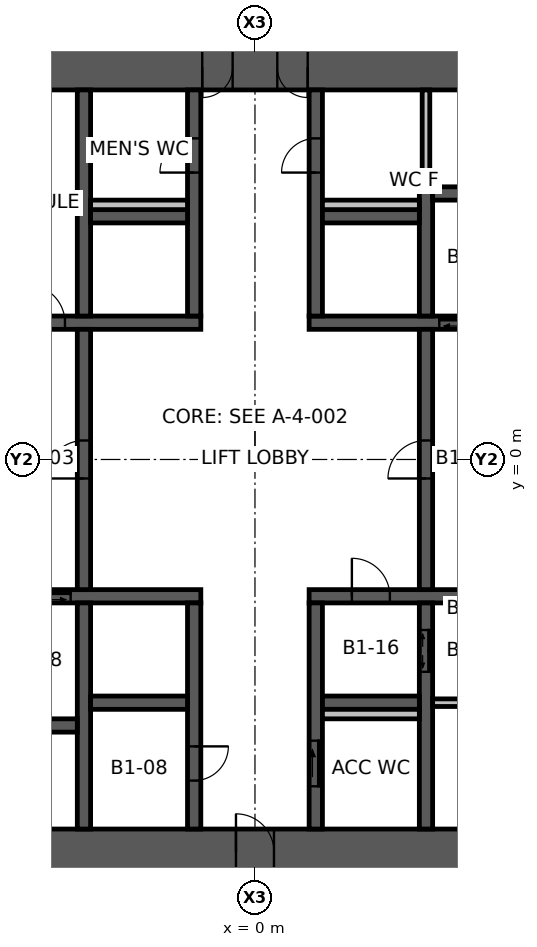
"""IFC4 building model, lengths in metres.
Left out: names, types, materials, properties, quantities, classifications, styles, units other than length and angle.
Written with IfcOpenShell. Run it as: python <this file> out.ifc"""

import sys

from ifc_helpers import new_model, si_unit, direction, frame, frame_2d, origin, place, context, subcontext, project, spatial, polyline, rectangle, outline, extrude, element, fill, save


model = new_model("IFC4")
c1 = context("Model", 3, precision=1e-05, world=origin(), true_north=direction((0.0, 1.0)))
c2 = subcontext(c1, "Body", "Model", "MODEL_VIEW")
j1 = project(units=[si_unit("LENGTHUNIT", "METRE"), si_unit("PLANEANGLEUNIT", "RADIAN")], contexts=[c1])
p1 = place(None, origin())
s1 = spatial("IfcSite", under=j1, at=p1, CompositionType="ELEMENT")
p2 = place(p1, origin())
s2 = spatial("IfcBuilding", under=s1, at=p2, CompositionType="ELEMENT")
p3 = place(p2, frame((0.0, 0.0, -5.0)))
s3 = spatial("IfcBuildingStorey", under=s2, at=p3, CompositionType="ELEMENT", Elevation=-5.0)
p4 = place(p3, frame((5.961, 10.325, 0.0), z_axis=(0.0, 0.0, 1.0), x_axis=(-1.0, 0.0, 0.0)))
e1 = element("IfcWall", 1, at=p4, inside=s3, PredefinedType="SHEAR", context=c2, shape_type="SweptSolid", body=[
    extrude(outline(polyline([(-0.346, -0.6), (4.574, -0.6), (5.374, -0.6), (6.549, -0.6), (7.349, -0.6), (12.269, -0.6), (11.576, 0.6), (7.349, 0.6), (6.549, 0.6), (5.374, 0.6), (4.574, 0.6), (0.346, 0.6), (-0.346, -0.6)])), origin(), (0.0, 0.0, 1.0), 5.0),
])
p5 = place(p4, frame((6.549, 0.0, 0.0)))
e2 = element("IfcOpeningElement", 2, at=p5, cuts=e1, PredefinedType="OPENING", context=c2, shape_type="SweptSolid", body=[
    extrude(rectangle(XDim=0.8, YDim=2.1, at=frame_2d((0.4, 1.05))), frame((0.0, 0.61, 0.0), z_axis=(0.0, -1.0, 0.0), x_axis=(1.0, 0.0, 0.0)), (0.0, 0.0, 1.0), 1.22),
])
p6 = place(p4, frame((4.574, 0.0, 0.0)))
e3 = element("IfcOpeningElement", 3, at=p6, cuts=e1, PredefinedType="OPENING", context=c2, shape_type="SweptSolid", body=[
    extrude(rectangle(XDim=0.8, YDim=2.1, at=frame_2d((0.4, 1.05))), frame((0.0, 0.61, 0.0), z_axis=(0.0, -1.0, 0.0), x_axis=(1.0, 0.0, 0.0)), (0.0, 0.0, 1.0), 1.22),
])
p7 = place(p3, frame((-5.961, -10.325, 0.0), z_axis=(0.0, 0.0, 1.0), x_axis=(1.0, 0.0, 0.0)))
e4 = element("IfcWall", 4, at=p7, inside=s3, PredefinedType="SHEAR", context=c2, shape_type="SweptSolid", body=[
    extrude(outline(polyline([(-0.346, -0.6), (5.461, -0.6), (6.461, -0.6), (12.269, -0.6), (11.576, 0.6), (6.461, 0.6), (5.461, 0.6), (0.346, 0.6), (-0.346, -0.6)])), origin(), (0.0, 0.0, 1.0), 5.0),
])
p8 = place(p7, frame((5.461, 0.0, 0.0)))
e5 = element("IfcOpeningElement", 5, at=p8, cuts=e4, PredefinedType="OPENING", context=c2, shape_type="SweptSolid", body=[
    extrude(rectangle(XDim=1.0, YDim=2.1, at=frame_2d((0.5, 1.05))), frame((0.0, 0.61, 0.0), z_axis=(0.0, -1.0, 0.0), x_axis=(1.0, 0.0, 0.0)), (0.0, 0.0, 1.0), 1.22),
])
p9 = place(p3, frame((-9.151, 3.6, 0.0), z_axis=(0.0, 0.0, 1.0), x_axis=(1.0, 0.0, 0.0)))
e6 = element("IfcWall", 6, at=p9, inside=s3, PredefinedType="SHEAR", context=c2, shape_type="SweptSolid", body=[
    extrude(outline(polyline([(-0.101, -0.175), (3.151, -0.175), (4.151, -0.175), (7.726, -0.175), (7.726, 0.175), (4.151, 0.175), (3.151, 0.175), (0.101, 0.175), (-0.101, -0.175)])), origin(), (0.0, 0.0, 1.0), 5.0),
])
p10 = place(p9, frame((3.151, 0.0, 0.0)))
e7 = element("IfcOpeningElement", 7, at=p10, cuts=e6, PredefinedType="OPENING", context=c2, shape_type="SweptSolid", body=[
    extrude(rectangle(XDim=1.0, YDim=2.1, at=frame_2d((0.5, 1.05))), frame((0.0, 0.185, 0.0), z_axis=(0.0, -1.0, 0.0), x_axis=(1.0, 0.0, 0.0)), (0.0, 0.0, 1.0), 0.37),
])
p11 = place(p3, frame((1.425, 3.6, 0.0), z_axis=(0.0, 0.0, 1.0), x_axis=(1.0, 0.0, 0.0)))
e8 = element("IfcWall", 8, at=p11, inside=s3, PredefinedType="SHEAR", context=c2, shape_type="SweptSolid", body=[
    extrude(outline(polyline([(0.0, -0.175), (3.425, -0.175), (4.725, -0.175), (7.827, -0.175), (7.625, 0.175), (4.725, 0.175), (3.425, 0.175), (0.0, 0.175), (0.0, -0.175)])), origin(), (0.0, 0.0, 1.0), 5.0),
])
p12 = place(p11, frame((3.425, 0.0, 0.0)))
e9 = element("IfcOpeningElement", 9, at=p12, cuts=e8, PredefinedType="OPENING", context=c2, shape_type="SweptSolid", body=[
    extrude(rectangle(XDim=1.3, YDim=2.1, at=frame_2d((0.65, 1.05))), frame((0.0, 0.185, 0.0), z_axis=(0.0, -1.0, 0.0), x_axis=(1.0, 0.0, 0.0)), (0.0, 0.0, 1.0), 0.37),
])
p13 = place(p3, frame((-9.151, -3.6, 0.0), z_axis=(0.0, 0.0, 1.0), x_axis=(1.0, 0.0, 0.0)))
e10 = element("IfcWall", 10, at=p13, inside=s3, PredefinedType="SHEAR", context=c2, shape_type="SweptSolid", body=[
    extrude(outline(polyline([(0.101, -0.175), (3.001, -0.175), (4.301, -0.175), (7.726, -0.175), (7.726, 0.175), (4.301, 0.175), (3.001, 0.175), (-0.101, 0.175), (0.101, -0.175)])), origin(), (0.0, 0.0, 1.0), 5.0),
])
p14 = place(p13, frame((3.001, 0.0, 0.0)))
e11 = element("IfcOpeningElement", 11, at=p14, cuts=e10, PredefinedType="OPENING", context=c2, shape_type="SweptSolid", body=[
    extrude(rectangle(XDim=1.3, YDim=2.1, at=frame_2d((0.65, 1.05))), frame((0.0, 0.185, 0.0), z_axis=(0.0, -1.0, 0.0), x_axis=(1.0, 0.0, 0.0)), (0.0, 0.0, 1.0), 0.37),
])
p15 = place(p3, frame((1.425, -3.6, 0.0), z_axis=(0.0, 0.0, 1.0), x_axis=(1.0, 0.0, 0.0)))
e12 = element("IfcWall", 12, at=p15, inside=s3, PredefinedType="SHEAR", context=c2, shape_type="SweptSolid", body=[
    extrude(outline(polyline([(0.0, -0.175), (1.125, -0.175), (2.125, -0.175), (7.625, -0.175), (7.827, 0.175), (2.125, 0.175), (1.125, 0.175), (0.0, 0.175), (0.0, -0.175)])), origin(), (0.0, 0.0, 1.0), 5.0),
])
p16 = place(p15, frame((1.125, 0.0, 0.0)))
e13 = element("IfcOpeningElement", 13, at=p16, cuts=e12, PredefinedType="OPENING", context=c2, shape_type="SweptSolid", body=[
    extrude(rectangle(XDim=1.0, YDim=2.1, at=frame_2d((0.5, 1.05))), frame((0.0, 0.185, 0.0), z_axis=(0.0, -1.0, 0.0), x_axis=(1.0, 0.0, 0.0)), (0.0, 0.0, 1.0), 0.37),
])
p17 = place(p3, frame((-1.6, 3.775, 0.0), z_axis=(0.0, 0.0, 1.0), x_axis=(0.0, 1.0, 0.0)))
e14 = element("IfcWall", 14, at=p17, inside=s3, PredefinedType="SHEAR", context=c2, shape_type="SweptSolid", body=[
    extrude(rectangle(XDim=5.95, YDim=0.35, at=frame_2d((2.975, 0.0))), origin(), (0.0, 0.0, 1.0), 5.0),
])
p18 = place(p17, frame((3.775, 0.0, 0.0)))
e15 = element("IfcOpeningElement", 15, at=p18, cuts=e14, PredefinedType="OPENING", context=c2, shape_type="SweptSolid", body=[
    extrude(rectangle(XDim=0.9, YDim=2.1, at=frame_2d((0.45, 1.05))), frame((0.0, 0.185, 0.0), z_axis=(0.0, -1.0, 0.0), x_axis=(1.0, 0.0, 0.0)), (0.0, 0.0, 1.0), 0.37),
])
p19 = place(p3, frame((1.6, 3.775, 0.0), z_axis=(0.0, 0.0, 1.0), x_axis=(0.0, 1.0, 0.0)))
e16 = element("IfcWall", 16, at=p19, inside=s3, PredefinedType="SHEAR", context=c2, shape_type="SweptSolid", body=[
    extrude(rectangle(XDim=5.95, YDim=0.35, at=frame_2d((2.975, 0.0))), origin(), (0.0, 0.0, 1.0), 5.0),
])
p20 = place(p19, frame((3.775, 0.0, 0.0)))
e17 = element("IfcOpeningElement", 17, at=p20, cuts=e16, PredefinedType="OPENING", context=c2, shape_type="SweptSolid", body=[
    extrude(rectangle(XDim=0.9, YDim=2.1, at=frame_2d((0.45, 1.05))), frame((0.0, 0.185, 0.0), z_axis=(0.0, -1.0, 0.0), x_axis=(1.0, 0.0, 0.0)), (0.0, 0.0, 1.0), 0.37),
])
p21 = place(p3, frame((-1.6, -3.775, 0.0), z_axis=(0.0, 0.0, 1.0), x_axis=(0.0, -1.0, 0.0)))
e18 = element("IfcWall", 18, at=p21, inside=s3, PredefinedType="SHEAR", context=c2, shape_type="SweptSolid", body=[
    extrude(rectangle(XDim=5.95, YDim=0.35, at=frame_2d((2.975, 0.0))), origin(), (0.0, 0.0, 1.0), 5.0),
])
p22 = place(p21, frame((3.775, 0.0, 0.0)))
e19 = element("IfcOpeningElement", 19, at=p22, cuts=e18, PredefinedType="OPENING", context=c2, shape_type="SweptSolid", body=[
    extrude(rectangle(XDim=0.9, YDim=2.1, at=frame_2d((0.45, 1.05))), frame((0.0, 0.185, 0.0), z_axis=(0.0, -1.0, 0.0), x_axis=(1.0, 0.0, 0.0)), (0.0, 0.0, 1.0), 0.37),
])
p23 = place(p3, frame((1.6, -3.775, 0.0), z_axis=(0.0, 0.0, 1.0), x_axis=(0.0, -1.0, 0.0)))
e20 = element("IfcWall", 20, at=p23, inside=s3, PredefinedType="SHEAR", context=c2, shape_type="SweptSolid", body=[
    extrude(rectangle(XDim=5.95, YDim=0.35, at=frame_2d((2.975, 0.0))), origin(), (0.0, 0.0, 1.0), 5.0),
])
p24 = place(p23, frame((3.625, 0.0, 0.0)))
e21 = element("IfcOpeningElement", 21, at=p24, cuts=e20, PredefinedType="OPENING", context=c2, shape_type="SweptSolid", body=[
    extrude(rectangle(XDim=1.2, YDim=2.1, at=frame_2d((0.6, 1.05))), frame((0.0, 0.185, 0.0), z_axis=(0.0, -1.0, 0.0), x_axis=(1.0, 0.0, 0.0)), (0.0, 0.0, 1.0), 0.37),
])
p25 = place(p3, frame((-4.5, -3.425, 0.0), z_axis=(0.0, 0.0, 1.0), x_axis=(0.0, 1.0, 0.0)))
e22 = element("IfcWall", 22, at=p25, inside=s3, PredefinedType="SHEAR", context=c2, shape_type="SweptSolid", body=[
    extrude(rectangle(XDim=6.85, YDim=0.35, at=frame_2d((3.425, 0.0))), origin(), (0.0, 0.0, 1.0), 5.0),
])
p26 = place(p25, frame((2.925, 0.0, 0.0)))
e23 = element("IfcOpeningElement", 23, at=p26, cuts=e22, PredefinedType="OPENING", context=c2, shape_type="SweptSolid", body=[
    extrude(rectangle(XDim=1.0, YDim=2.1, at=frame_2d((0.5, 1.05))), frame((0.0, 0.185, 0.0), z_axis=(0.0, -1.0, 0.0), x_axis=(1.0, 0.0, 0.0)), (0.0, 0.0, 1.0), 0.37),
])
p27 = place(p3, frame((4.5, -3.425, 0.0), z_axis=(0.0, 0.0, 1.0), x_axis=(0.0, 1.0, 0.0)))
e24 = element("IfcWall", 24, at=p27, inside=s3, PredefinedType="SHEAR", context=c2, shape_type="SweptSolid", body=[
    extrude(rectangle(XDim=6.85, YDim=0.35, at=frame_2d((3.425, 0.0))), origin(), (0.0, 0.0, 1.0), 5.0),
])
p28 = place(p27, frame((2.925, 0.0, 0.0)))
e25 = element("IfcOpeningElement", 25, at=p28, cuts=e24, PredefinedType="OPENING", context=c2, shape_type="SweptSolid", body=[
    extrude(rectangle(XDim=1.0, YDim=2.1, at=frame_2d((0.5, 1.05))), frame((0.0, 0.185, 0.0), z_axis=(0.0, -1.0, 0.0), x_axis=(1.0, 0.0, 0.0)), (0.0, 0.0, 1.0), 0.37),
])
p29 = place(p3, frame((-4.5, 3.775, 0.0), z_axis=(0.0, 0.0, 1.0), x_axis=(0.0, 1.0, 0.0)))
e26 = element("IfcWall", 26, at=p29, inside=s3, PredefinedType="SHEAR", context=c2, shape_type="SweptSolid", body=[
    extrude(rectangle(XDim=5.95, YDim=0.35, at=frame_2d((2.975, 0.0))), origin(), (0.0, 0.0, 1.0), 5.0),
])
p30 = place(p3, frame((4.5, 3.775, 0.0), z_axis=(0.0, 0.0, 1.0), x_axis=(0.0, 1.0, 0.0)))
e27 = element("IfcWall", 27, at=p30, inside=s3, PredefinedType="SHEAR", context=c2, shape_type="SweptSolid", body=[
    extrude(rectangle(XDim=3.4, YDim=0.35, at=frame_2d((1.7, 0.0))), origin(), (0.0, 0.0, 1.0), 5.0),
])
p31 = place(p3, frame((-4.5, -3.775, 0.0), z_axis=(0.0, 0.0, 1.0), x_axis=(0.0, -1.0, 0.0)))
e28 = element("IfcWall", 28, at=p31, inside=s3, PredefinedType="SHEAR", context=c2, shape_type="SweptSolid", body=[
    extrude(rectangle(XDim=5.95, YDim=0.35, at=frame_2d((2.975, 0.0))), origin(), (0.0, 0.0, 1.0), 5.0),
])
p32 = place(p3, frame((4.5, -3.775, 0.0), z_axis=(0.0, 0.0, 1.0), x_axis=(0.0, -1.0, 0.0)))
e29 = element("IfcWall", 29, at=p32, inside=s3, PredefinedType="SHEAR", context=c2, shape_type="SweptSolid", body=[
    extrude(rectangle(XDim=5.95, YDim=0.35, at=frame_2d((2.975, 0.0))), origin(), (0.0, 0.0, 1.0), 5.0),
])
p33 = place(p32, frame((0.712, 0.0, 0.0)))
e30 = element("IfcOpeningElement", 30, at=p33, cuts=e29, PredefinedType="OPENING", context=c2, shape_type="SweptSolid", body=[
    extrude(rectangle(XDim=1.1, YDim=2.1, at=frame_2d((0.55, 1.05))), frame((0.0, 0.185, 0.0), z_axis=(0.0, -1.0, 0.0), x_axis=(1.0, 0.0, 0.0)), (0.0, 0.0, 1.0), 0.37),
])
for number, where, z_axis, x_axis in (
    (31, (-4.325, 6.4, 0.0), (0.0, 0.0, 1.0), (1.0, 0.0, 0.0)),
    (32, (1.775, 6.4, 0.0), (0.0, 0.0, 1.0), (1.0, 0.0, 0.0)),
    (33, (-4.325, -6.4, 0.0), (0.0, 0.0, 1.0), (1.0, 0.0, 0.0)),
    (34, (1.775, -6.4, 0.0), (0.0, 0.0, 1.0), (1.0, 0.0, 0.0)),
):
    element("IfcWall", number, at=place(p3, frame(where, z_axis=z_axis, x_axis=x_axis)), inside=s3, PredefinedType="SHEAR", context=c2, shape_type="SweptSolid", body=[
        extrude(rectangle(XDim=2.55, YDim=0.35, at=frame_2d((1.275, 0.0))), origin(), (0.0, 0.0, 1.0), 5.0),
    ])
for number, where, z_axis, x_axis in (
    (35, (-6.925, -7.0, 0.0), (0.0, 0.0, 1.0), (1.0, 0.0, 0.0)),
    (36, (4.675, 7.0, 0.0), (0.0, 0.0, 1.0), (1.0, 0.0, 0.0)),
):
    element("IfcWall", number, at=place(p3, frame(where, z_axis=z_axis, x_axis=x_axis)), inside=s3, PredefinedType="SHEAR", context=c2, shape_type="SweptSolid", body=[
        extrude(rectangle(XDim=2.25, YDim=0.35, at=frame_2d((1.125, 0.0))), origin(), (0.0, 0.0, 1.0), 5.0),
    ])
p34 = place(p3, frame((4.5, 7.175, 0.0), z_axis=(0.0, 0.0, 1.0), x_axis=(0.0, 1.0, 0.0)))
e37 = element("IfcWall", 37, at=p34, inside=s3, PredefinedType="STANDARD", context=c2, shape_type="SweptSolid", body=[
    extrude(rectangle(XDim=2.55, YDim=0.2, at=frame_2d((1.275, 0.0))), origin(), (0.0, 0.0, 1.0), 5.0),
])
p35 = place(p3, frame((4.675, -6.4, 0.0), z_axis=(0.0, 0.0, 1.0), x_axis=(1.0, 0.0, 0.0)))
e38 = element("IfcWall", 38, at=p35, inside=s3, PredefinedType="STANDARD", context=c2, shape_type="SweptSolid", body=[
    extrude(rectangle(XDim=2.425, YDim=0.2, at=frame_2d((1.212, 0.0))), origin(), (0.0, 0.0, 1.0), 5.0),
])
for number, where, z_axis, x_axis in (
    (39, (-4.325, 6.7, 0.0), (0.0, 0.0, 1.0), (1.0, 0.0, 0.0)),
    (40, (1.775, 6.7, 0.0), (0.0, 0.0, 1.0), (1.0, 0.0, 0.0)),
    (41, (1.775, -6.7, 0.0), (0.0, 0.0, 1.0), (1.0, 0.0, 0.0)),
):
    element("IfcWall", number, at=place(p3, frame(where, z_axis=z_axis, x_axis=x_axis)), inside=s3, PredefinedType="PLUMBINGWALL", context=c2, shape_type="SweptSolid", body=[
        extrude(rectangle(XDim=2.55, YDim=0.25, at=frame_2d((1.275, 0.0))), origin(), (0.0, 0.0, 1.0), 5.0),
    ])
p36 = place(p5, origin())
e42 = element("IfcDoor", 42, at=p36, inside=s3, OperationType="SINGLE_SWING_RIGHT", PredefinedType="DOOR", context=c2, shape_type="SweptSolid", body=[
    extrude(rectangle(XDim=0.8, YDim=2.1, at=frame_2d((0.4, 1.05))), frame((0.0, 0.025, 0.0), z_axis=(0.0, -1.0, 0.0), x_axis=(1.0, 0.0, 0.0)), (0.0, 0.0, 1.0), 0.05),
])
fill(e2, e42)
p37 = place(p6, origin())
e43 = element("IfcDoor", 43, at=p37, inside=s3, OperationType="SINGLE_SWING_LEFT", PredefinedType="DOOR", context=c2, shape_type="SweptSolid", body=[
    extrude(rectangle(XDim=0.8, YDim=2.1, at=frame_2d((0.4, 1.05))), frame((0.0, 0.025, 0.0), z_axis=(0.0, -1.0, 0.0), x_axis=(1.0, 0.0, 0.0)), (0.0, 0.0, 1.0), 0.05),
])
fill(e3, e43)
p38 = place(p8, origin())
e44 = element("IfcDoor", 44, at=p38, inside=s3, OperationType="SINGLE_SWING_LEFT", PredefinedType="DOOR", context=c2, shape_type="SweptSolid", body=[
    extrude(rectangle(XDim=1.0, YDim=2.1, at=frame_2d((0.5, 1.05))), frame((0.0, 0.025, 0.0), z_axis=(0.0, -1.0, 0.0), x_axis=(1.0, 0.0, 0.0)), (0.0, 0.0, 1.0), 0.05),
])
fill(e5, e44)
p39 = place(p28, origin())
e45 = element("IfcDoor", 45, at=p39, inside=s3, OperationType="SINGLE_SWING_LEFT", PredefinedType="DOOR", context=c2, shape_type="SweptSolid", body=[
    extrude(rectangle(XDim=1.0, YDim=2.1, at=frame_2d((0.5, 1.05))), frame((0.0, 0.025, 0.0), z_axis=(0.0, -1.0, 0.0), x_axis=(1.0, 0.0, 0.0)), (0.0, 0.0, 1.0), 0.05),
])
fill(e25, e45)
p40 = place(p26, origin())
e46 = element("IfcDoor", 46, at=p40, inside=s3, OperationType="SINGLE_SWING_LEFT", PredefinedType="DOOR", context=c2, shape_type="SweptSolid", body=[
    extrude(rectangle(XDim=1.0, YDim=2.1, at=frame_2d((0.5, 1.05))), frame((0.0, 0.025, 0.0), z_axis=(0.0, -1.0, 0.0), x_axis=(1.0, 0.0, 0.0)), (0.0, 0.0, 1.0), 0.05),
])
fill(e23, e46)
p41 = place(p10, origin())
e47 = element("IfcDoor", 47, at=p41, inside=s3, OperationType="SINGLE_SWING_LEFT", PredefinedType="DOOR", context=c2, shape_type="SweptSolid", body=[
    extrude(rectangle(XDim=1.0, YDim=2.1, at=frame_2d((0.5, 1.05))), frame((0.0, 0.025, 0.0), z_axis=(0.0, -1.0, 0.0), x_axis=(1.0, 0.0, 0.0)), (0.0, 0.0, 1.0), 0.05),
])
fill(e7, e47)
p42 = place(p18, origin())
e48 = element("IfcDoor", 48, at=p42, inside=s3, OperationType="SINGLE_SWING_LEFT", PredefinedType="DOOR", context=c2, shape_type="SweptSolid", body=[
    extrude(rectangle(XDim=0.9, YDim=2.1, at=frame_2d((0.45, 1.05))), frame((0.0, 0.025, 0.0), z_axis=(0.0, -1.0, 0.0), x_axis=(1.0, 0.0, 0.0)), (0.0, 0.0, 1.0), 0.05),
])
fill(e15, e48)
p43 = place(p20, origin())
e49 = element("IfcDoor", 49, at=p43, inside=s3, OperationType="SINGLE_SWING_LEFT", PredefinedType="DOOR", context=c2, shape_type="SweptSolid", body=[
    extrude(rectangle(XDim=0.9, YDim=2.1, at=frame_2d((0.45, 1.05))), frame((0.0, 0.025, 0.0), z_axis=(0.0, -1.0, 0.0), x_axis=(1.0, 0.0, 0.0)), (0.0, 0.0, 1.0), 0.05),
])
fill(e17, e49)
p44 = place(p24, origin())
e50 = element("IfcDoor", 50, at=p44, inside=s3, OperationType="SLIDING_TO_LEFT", PredefinedType="DOOR", context=c2, shape_type="SweptSolid", body=[
    extrude(rectangle(XDim=1.2, YDim=2.1, at=frame_2d((0.6, 1.05))), frame((0.0, 0.025, 0.0), z_axis=(0.0, -1.0, 0.0), x_axis=(1.0, 0.0, 0.0)), (0.0, 0.0, 1.0), 0.05),
])
fill(e21, e50)
p45 = place(p22, origin())
e51 = element("IfcDoor", 51, at=p45, inside=s3, OperationType="SINGLE_SWING_LEFT", PredefinedType="DOOR", context=c2, shape_type="SweptSolid", body=[
    extrude(rectangle(XDim=0.9, YDim=2.1, at=frame_2d((0.45, 1.05))), frame((0.0, 0.025, 0.0), z_axis=(0.0, -1.0, 0.0), x_axis=(1.0, 0.0, 0.0)), (0.0, 0.0, 1.0), 0.05),
])
fill(e19, e51)
p46 = place(p16, origin())
e52 = element("IfcDoor", 52, at=p46, inside=s3, OperationType="SINGLE_SWING_LEFT", PredefinedType="DOOR", context=c2, shape_type="SweptSolid", body=[
    extrude(rectangle(XDim=1.0, YDim=2.1, at=frame_2d((0.5, 1.05))), frame((0.0, 0.025, 0.0), z_axis=(0.0, -1.0, 0.0), x_axis=(1.0, 0.0, 0.0)), (0.0, 0.0, 1.0), 0.05),
])
fill(e13, e52)
p47 = place(p33, origin())
e53 = element("IfcDoor", 53, at=p47, inside=s3, OperationType="DOUBLE_DOOR_SLIDING", PredefinedType="DOOR", context=c2, shape_type="SweptSolid", body=[
    extrude(rectangle(XDim=1.1, YDim=2.1, at=frame_2d((0.55, 1.05))), frame((0.0, 0.025, 0.0), z_axis=(0.0, -1.0, 0.0), x_axis=(1.0, 0.0, 0.0)), (0.0, 0.0, 1.0), 0.05),
])
fill(e30, e53)
p48 = place(p12, origin())
e54 = element("IfcDoor", 54, at=p48, inside=s3, OperationType="DOUBLE_DOOR_SLIDING", PredefinedType="DOOR", context=c2, shape_type="SweptSolid", body=[
    extrude(rectangle(XDim=1.3, YDim=2.1, at=frame_2d((0.65, 1.05))), frame((0.0, 0.025, 0.0), z_axis=(0.0, -1.0, 0.0), x_axis=(1.0, 0.0, 0.0)), (0.0, 0.0, 1.0), 0.05),
])
fill(e9, e54)
p49 = place(p14, origin())
e55 = element("IfcDoor", 55, at=p49, inside=s3, OperationType="DOUBLE_DOOR_SLIDING", PredefinedType="DOOR", context=c2, shape_type="SweptSolid", body=[
    extrude(rectangle(XDim=1.3, YDim=2.1, at=frame_2d((0.65, 1.05))), frame((0.0, 0.025, 0.0), z_axis=(0.0, -1.0, 0.0), x_axis=(1.0, 0.0, 0.0)), (0.0, 0.0, 1.0), 0.05),
])
fill(e11, e55)
save(model, sys.argv[1])
